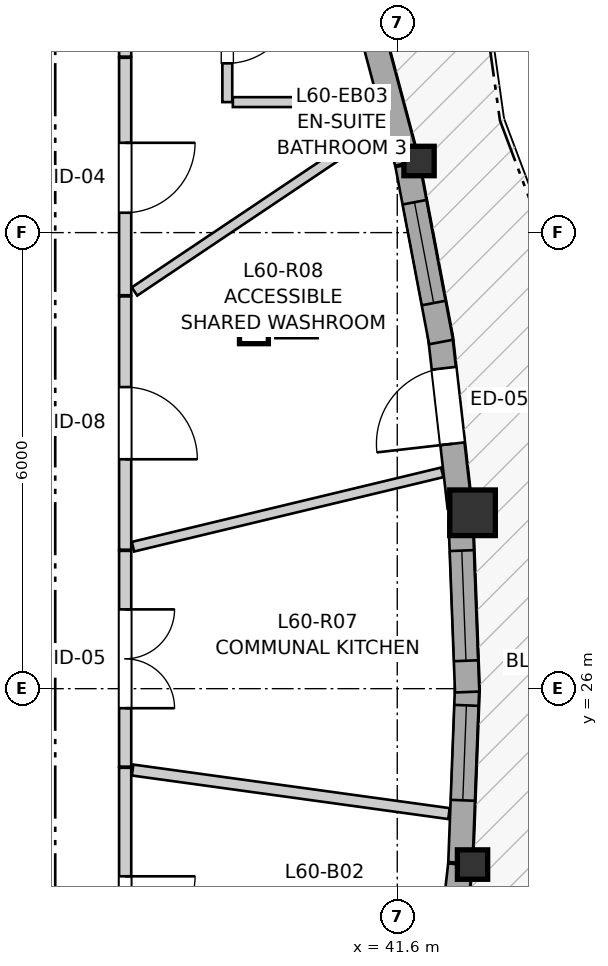
"""IFC4 building model, lengths in metres.
Left out: names, types, materials, properties, quantities, classifications, styles, units other than length and angle.
Written with IfcOpenShell. Run it as: python <this file> out.ifc"""

import sys

from ifc_helpers import new_model, si_unit, direction, frame, frame_2d, origin, origin_2d, place, context, subcontext, project, spatial, rectangle, i_section, extrude, source, transform, mapped, element, fill, save


model = new_model("IFC4")
c1 = context("Model", 3, precision=1e-05, world=origin(), true_north=direction((0.0, 1.0)))
c2 = subcontext(c1, "Body", "Model", "MODEL_VIEW")
j1 = project(units=[si_unit("LENGTHUNIT", "METRE"), si_unit("PLANEANGLEUNIT", "RADIAN")], contexts=[c1])
p1 = place(None, origin())
s1 = spatial("IfcSite", under=j1, at=p1, CompositionType="ELEMENT")
p2 = place(p1, origin())
s2 = spatial("IfcBuilding", under=s1, at=p2, CompositionType="ELEMENT")
p3 = place(p2, frame((0.0, 0.0, 202.0)))
s3 = spatial("IfcBuildingStorey", under=s2, at=p3, CompositionType="ELEMENT", Elevation=202.0)
m1 = source(origin(), c2, "Body", "SweptSolid", [
    extrude(i_section(OverallWidth=0.398, OverallDepth=0.387, WebThickness=0.019, FlangeThickness=0.03, FilletRadius=0.015, at=origin_2d()), origin(), (0.0, 0.0, 1.0), 2.935),
])
p4 = place(p3, frame((42.59, 23.686, 0.0), z_axis=(0.0, 0.0, 1.0), x_axis=(1.0, 0.0, 0.0)))
e1 = element("IfcColumn", 1, at=p4, inside=s3, PredefinedType="PILASTER", context=c2, shape_type="MappedRepresentation", body=[
    mapped(m1, transform((0.0, 0.0, 0.0), x_axis=(1.0, 0.0, 0.0), y_axis=(0.0, 1.0, 0.0), z_axis=(0.0, 0.0, 1.0), scale=1.0)),
])
m2 = source(origin(), c2, "Body", "SweptSolid", [
    extrude(rectangle(XDim=0.6, YDim=0.6, at=origin_2d()), origin(), (0.0, 0.0, 1.0), 2.935),
])
p5 = place(p3, frame((42.59, 28.314, 0.0), z_axis=(0.0, 0.0, 1.0), x_axis=(1.0, 0.0, 0.0)))
e2 = element("IfcColumn", 2, at=p5, inside=s3, PredefinedType="COLUMN", context=c2, shape_type="MappedRepresentation", body=[
    mapped(m2, transform((0.0, 0.0, 0.0), x_axis=(1.0, 0.0, 0.0), y_axis=(0.0, 1.0, 0.0), z_axis=(0.0, 0.0, 1.0), scale=1.0)),
])
p6 = place(p3, frame((41.887, 32.942, 0.0), z_axis=(0.0, 0.0, 1.0), x_axis=(1.0, 0.0, 0.0)))
e3 = element("IfcColumn", 3, at=p6, inside=s3, PredefinedType="PILASTER", context=c2, shape_type="MappedRepresentation", body=[
    mapped(m1, transform((0.0, 0.0, 0.0), x_axis=(1.0, 0.0, 0.0), y_axis=(0.0, 1.0, 0.0), z_axis=(0.0, 0.0, 1.0), scale=1.0)),
])
p7 = place(p3, frame((42.163, 21.352, 0.0), z_axis=(0.0, 0.0, 1.0), x_axis=(0.113273764078, 0.993563814947, 0.0)))
e4 = element("IfcWall", 4, at=p7, inside=s3, PredefinedType="SOLIDWALL", context=c2, shape_type="SweptSolid", body=[
    extrude(rectangle(XDim=2.347, YDim=0.32, at=frame_2d((1.174, 0.0))), origin(), (0.0, 0.0, 1.0), 2.555),
])
p8 = place(p7, frame((0.608, 0.0, 0.82)))
e5 = element("IfcOpeningElement", 5, at=p8, cuts=e4, PredefinedType="OPENING", context=c2, shape_type="SweptSolid", body=[
    extrude(rectangle(XDim=1.15, YDim=1.2, at=frame_2d((0.575, 0.6))), frame((0.0, 0.17, 0.0), z_axis=(0.0, -1.0, 0.0), x_axis=(1.0, 0.0, 0.0)), (0.0, 0.0, 1.0), 0.34),
])
p9 = place(p3, frame((42.431, 23.712, 0.0), z_axis=(0.0, 0.0, 1.0), x_axis=(0.037979071107, 0.999278534823, 0.0)))
e6 = element("IfcWall", 6, at=p9, inside=s3, PredefinedType="SOLIDWALL", context=c2, shape_type="SweptSolid", body=[
    extrude(rectangle(XDim=2.333, YDim=0.32, at=frame_2d((1.167, 0.0))), origin(), (0.0, 0.0, 1.0), 2.555),
])
p10 = place(p9, frame((0.82, 0.0, 0.82)))
e7 = element("IfcOpeningElement", 7, at=p10, cuts=e6, PredefinedType="OPENING", context=c2, shape_type="SweptSolid", body=[
    extrude(rectangle(XDim=1.25, YDim=1.35, at=frame_2d((0.625, 0.675))), frame((0.0, 0.17, 0.0), z_axis=(0.0, -1.0, 0.0), x_axis=(1.0, 0.0, 0.0)), (0.0, 0.0, 1.0), 0.34),
])
p11 = place(p3, frame((42.52, 25.956, 0.0), z_axis=(0.0, 0.0, 1.0), x_axis=(-0.038072753844, 0.999274969873, 0.0)))
e8 = element("IfcWall", 8, at=p11, inside=s3, PredefinedType="SOLIDWALL", context=c2, shape_type="SweptSolid", body=[
    extrude(rectangle(XDim=2.264, YDim=0.32, at=frame_2d((1.132, 0.0))), origin(), (0.0, 0.0, 1.0), 2.555),
])
p12 = place(p11, frame((0.412, 0.0, 0.82)))
e9 = element("IfcOpeningElement", 9, at=p12, cuts=e8, PredefinedType="OPENING", context=c2, shape_type="SweptSolid", body=[
    extrude(rectangle(XDim=1.45, YDim=1.25, at=frame_2d((0.725, 0.625))), frame((0.0, 0.17, 0.0), z_axis=(0.0, -1.0, 0.0), x_axis=(1.0, 0.0, 0.0)), (0.0, 0.0, 1.0), 0.34),
])
p13 = place(p3, frame((42.421, 28.385, 0.0), z_axis=(0.0, 0.0, 1.0), x_axis=(-0.113220012761, 0.993569941529, 0.0)))
e10 = element("IfcWall", 10, at=p13, inside=s3, PredefinedType="SOLIDWALL", context=c2, shape_type="SweptSolid", body=[
    extrude(rectangle(XDim=2.277, YDim=0.32, at=frame_2d((1.139, 0.0))), origin(), (0.0, 0.0, 1.0), 2.555),
])
p14 = place(p13, frame((0.842, 0.0, 0.0)))
e11 = element("IfcOpeningElement", 11, at=p14, cuts=e10, PredefinedType="OPENING", context=c2, shape_type="SweptSolid", body=[
    extrude(rectangle(XDim=1.0, YDim=2.1, at=frame_2d((0.5, 1.05))), frame((0.0, 0.17, 0.0), z_axis=(0.0, -1.0, 0.0), x_axis=(1.0, 0.0, 0.0)), (0.0, 0.0, 1.0), 0.34),
])
p15 = place(p3, frame((42.177, 30.561, 0.0), z_axis=(0.0, 0.0, 1.0), x_axis=(-0.186691421418, 0.982418603839, 0.0)))
e12 = element("IfcWall", 12, at=p15, inside=s3, PredefinedType="SOLIDWALL", context=c2, shape_type="SweptSolid", body=[
    extrude(rectangle(XDim=2.374, YDim=0.32, at=frame_2d((1.187, 0.0))), origin(), (0.0, 0.0, 1.0), 2.555),
])
p16 = place(p15, frame((0.522, 0.0, 0.82)))
e13 = element("IfcOpeningElement", 13, at=p16, cuts=e12, PredefinedType="OPENING", context=c2, shape_type="SweptSolid", body=[
    extrude(rectangle(XDim=1.35, YDim=1.45, at=frame_2d((0.675, 0.725))), frame((0.0, 0.17, 0.0), z_axis=(0.0, -1.0, 0.0), x_axis=(1.0, 0.0, 0.0)), (0.0, 0.0, 1.0), 0.34),
])
p17 = place(p3, frame((41.727, 32.92, 0.0), z_axis=(0.0, 0.0, 1.0), x_axis=(-0.257057896323, 0.96639600472, 0.0)))
e14 = element("IfcWall", 14, at=p17, inside=s3, PredefinedType="SOLIDWALL", context=c2, shape_type="SweptSolid", body=[
    extrude(rectangle(XDim=2.412, YDim=0.32, at=frame_2d((1.206, 0.0))), origin(), (0.0, 0.0, 1.0), 2.555),
])
p18 = place(p3, frame((38.02, 24.959, 0.0), z_axis=(0.0, 0.0, 1.0), x_axis=(0.0, -1.0, 0.0)))
e15 = element("IfcWall", 15, at=p18, inside=s3, PredefinedType="PARTITIONING", context=c2, shape_type="SweptSolid", body=[
    extrude(rectangle(XDim=3.759, YDim=0.16, at=frame_2d((1.879, 0.0))), origin(), (0.0, 0.0, 1.0), 2.935),
])
p19 = place(p18, frame((1.427, 0.0, 0.0)))
e16 = element("IfcOpeningElement", 16, at=p19, cuts=e15, PredefinedType="OPENING", context=c2, shape_type="SweptSolid", body=[
    extrude(rectangle(XDim=0.92, YDim=2.1, at=frame_2d((0.46, 1.05))), frame((0.0, 0.09, 0.0), z_axis=(0.0, -1.0, 0.0), x_axis=(1.0, 0.0, 0.0)), (0.0, 0.0, 1.0), 0.18),
])
p20 = place(p3, frame((38.02, 31.161, 0.0), z_axis=(0.0, 0.0, 1.0), x_axis=(0.0, -1.0, 0.0)))
e17 = element("IfcWall", 17, at=p20, inside=s3, PredefinedType="PARTITIONING", context=c2, shape_type="SweptSolid", body=[
    extrude(rectangle(XDim=3.333, YDim=0.16, at=frame_2d((1.667, 0.0))), origin(), (0.0, 0.0, 1.0), 2.603),
])
p21 = place(p20, frame((1.193, 0.0, 0.0)))
e18 = element("IfcOpeningElement", 18, at=p21, cuts=e17, PredefinedType="OPENING", context=c2, shape_type="SweptSolid", body=[
    extrude(rectangle(XDim=0.95, YDim=2.1, at=frame_2d((0.475, 1.05))), frame((0.0, 0.09, 0.0), z_axis=(0.0, -1.0, 0.0), x_axis=(1.0, 0.0, 0.0)), (0.0, 0.0, 1.0), 0.18),
])
p22 = place(p3, frame((38.02, 34.3, 0.0), z_axis=(0.0, 0.0, 1.0), x_axis=(0.0, -1.0, 0.0)))
e19 = element("IfcWall", 19, at=p22, inside=s3, PredefinedType="PARTITIONING", context=c2, shape_type="SweptSolid", body=[
    extrude(rectangle(XDim=3.124, YDim=0.16, at=frame_2d((1.562, 0.0))), origin(), (0.0, 0.0, 1.0), 2.603),
])
p23 = place(p22, frame((1.118, 0.0, 0.0)))
e20 = element("IfcOpeningElement", 20, at=p23, cuts=e19, PredefinedType="OPENING", context=c2, shape_type="SweptSolid", body=[
    extrude(rectangle(XDim=0.92, YDim=2.1, at=frame_2d((0.46, 1.05))), frame((0.0, 0.09, 0.0), z_axis=(0.0, -1.0, 0.0), x_axis=(1.0, 0.0, 0.0)), (0.0, 0.0, 1.0), 0.18),
])
p24 = place(p3, frame((38.02, 27.813, 0.0), z_axis=(0.0, 0.0, 1.0), x_axis=(0.0, -1.0, 0.0)))
e21 = element("IfcWall", 21, at=p24, inside=s3, PredefinedType="PARTITIONING", context=c2, shape_type="SweptSolid", body=[
    extrude(rectangle(XDim=2.839, YDim=0.16, at=frame_2d((1.419, 0.0))), origin(), (0.0, 0.0, 1.0), 2.935),
])
p25 = place(p24, frame((0.77, 0.0, 0.0)))
e22 = element("IfcOpeningElement", 22, at=p25, cuts=e21, PredefinedType="OPENING", context=c2, shape_type="SweptSolid", body=[
    extrude(rectangle(XDim=1.3, YDim=2.1, at=frame_2d((0.65, 1.05))), frame((0.0, 0.09, 0.0), z_axis=(0.0, -1.0, 0.0), x_axis=(1.0, 0.0, 0.0)), (0.0, 0.0, 1.0), 0.18),
])
p26 = place(p3, frame((39.364, 35.617, 0.0), z_axis=(0.0, 0.0, 1.0), x_axis=(0.0, -1.0, 0.0)))
e23 = element("IfcWall", 23, at=p26, inside=s3, PredefinedType="PARTITIONING", context=c2, shape_type="SweptSolid", body=[
    extrude(rectangle(XDim=1.9, YDim=0.13, at=frame_2d((0.95, 0.0))), origin(), (0.0, 0.0, 1.0), 2.573),
])
p27 = place(p26, frame((0.51, 0.0, 0.0)))
e24 = element("IfcOpeningElement", 24, at=p27, cuts=e23, PredefinedType="OPENING", context=c2, shape_type="SweptSolid", body=[
    extrude(rectangle(XDim=0.88, YDim=2.05, at=frame_2d((0.44, 1.025))), frame((0.0, 0.075, 0.0), z_axis=(0.0, -1.0, 0.0), x_axis=(1.0, 0.0, 0.0)), (0.0, 0.0, 1.0), 0.15),
])
p28 = place(p3, frame((38.118, 24.929, 0.0), z_axis=(0.0, 0.0, 1.0), x_axis=(0.990658246077, -0.136368029533, 0.0)))
e25 = element("IfcWall", 25, at=p28, inside=s3, PredefinedType="PARTITIONING", context=c2, shape_type="SweptSolid", body=[
    extrude(rectangle(XDim=4.202, YDim=0.145, at=frame_2d((2.101, 0.0))), origin(), (0.0, 0.0, 1.0), 2.935),
])
p29 = place(p3, frame((38.123, 27.868, 0.0), z_axis=(0.0, 0.0, 1.0), x_axis=(0.972302502293, 0.233726002051, 0.0)))
e26 = element("IfcWall", 26, at=p29, inside=s3, PredefinedType="PARTITIONING", context=c2, shape_type="SweptSolid", body=[
    extrude(rectangle(XDim=4.185, YDim=0.13, at=frame_2d((2.092, 0.0))), origin(), (0.0, 0.0, 1.0), 2.935),
])
p30 = place(p3, frame((38.143, 31.225, 0.0), z_axis=(0.0, 0.0, 1.0), x_axis=(0.830560844451, 0.556927898084, 0.0)))
e27 = element("IfcWall", 27, at=p30, inside=s3, PredefinedType="PARTITIONING", context=c2, shape_type="SweptSolid", body=[
    extrude(rectangle(XDim=3.942, YDim=0.13, at=frame_2d((1.971, 0.0))), origin(), (0.0, 0.0, 1.0), 2.935),
])
p31 = place(p3, frame((39.437, 33.717, 0.0), z_axis=(0.0, 0.0, 1.0), x_axis=(1.0, 0.0, 0.0)))
e28 = element("IfcWall", 28, at=p31, inside=s3, PredefinedType="PARTITIONING", context=c2, shape_type="SweptSolid", body=[
    extrude(rectangle(XDim=1.727, YDim=0.13, at=frame_2d((0.864, 0.0))), origin(), (0.0, 0.0, 1.0), 2.935),
])
p32 = place(p3, frame((38.02, 34.315, 0.0), z_axis=(0.0, 0.0, 1.0), x_axis=(0.0, 1.0, 0.0)))
e29 = element("IfcWall", 29, at=p32, inside=s3, PredefinedType="PARTITIONING", context=c2, shape_type="SweptSolid", body=[
    extrude(rectangle(XDim=1.605, YDim=0.16, at=frame_2d((0.802, 0.0))), origin(), (0.0, 0.0, 1.0), 2.603),
])
m3 = source(origin(), c2, "Body", "SweptSolid", [
    extrude(rectangle(XDim=1.25, YDim=1.35, at=frame_2d((0.625, 0.675))), frame((0.0, 0.03, 0.0), z_axis=(0.0, -1.0, 0.0), x_axis=(1.0, 0.0, 0.0)), (0.0, 0.0, 1.0), 0.06),
])
p33 = place(p10, origin())
e30 = element("IfcWindow", 30, at=p33, inside=s3, PartitioningType="SINGLE_PANEL", PredefinedType="WINDOW", context=c2, shape_type="MappedRepresentation", body=[
    mapped(m3, transform((0.0, 0.0, 0.0), x_axis=(1.0, 0.0, 0.0), y_axis=(0.0, 1.0, 0.0), z_axis=(0.0, 0.0, 1.0), scale=1.0)),
])
fill(e7, e30)
m4 = source(origin(), c2, "Body", "SweptSolid", [
    extrude(rectangle(XDim=1.45, YDim=1.25, at=frame_2d((0.725, 0.625))), frame((0.0, 0.03, 0.0), z_axis=(0.0, -1.0, 0.0), x_axis=(1.0, 0.0, 0.0)), (0.0, 0.0, 1.0), 0.06),
])
p34 = place(p12, origin())
e31 = element("IfcWindow", 31, at=p34, inside=s3, PartitioningType="SINGLE_PANEL", PredefinedType="WINDOW", context=c2, shape_type="MappedRepresentation", body=[
    mapped(m4, transform((0.0, 0.0, 0.0), x_axis=(1.0, 0.0, 0.0), y_axis=(0.0, 1.0, 0.0), z_axis=(0.0, 0.0, 1.0), scale=1.0)),
])
fill(e9, e31)
m5 = source(origin(), c2, "Body", "SweptSolid", [
    extrude(rectangle(XDim=1.0, YDim=2.1, at=frame_2d((0.5, 1.05))), frame((0.0, 0.025, 0.0), z_axis=(0.0, -1.0, 0.0), x_axis=(1.0, 0.0, 0.0)), (0.0, 0.0, 1.0), 0.05),
])
p35 = place(p14, origin())
e32 = element("IfcDoor", 32, at=p35, inside=s3, OperationType="SINGLE_SWING_LEFT", PredefinedType="DOOR", context=c2, shape_type="MappedRepresentation", body=[
    mapped(m5, transform((0.0, 0.0, 0.0), x_axis=(1.0, 0.0, 0.0), y_axis=(0.0, 1.0, 0.0), z_axis=(0.0, 0.0, 1.0), scale=1.0)),
])
fill(e11, e32)
m6 = source(origin(), c2, "Body", "SweptSolid", [
    extrude(rectangle(XDim=1.35, YDim=1.45, at=frame_2d((0.675, 0.725))), frame((0.0, 0.03, 0.0), z_axis=(0.0, -1.0, 0.0), x_axis=(1.0, 0.0, 0.0)), (0.0, 0.0, 1.0), 0.06),
])
p36 = place(p16, origin())
e33 = element("IfcWindow", 33, at=p36, inside=s3, PartitioningType="SINGLE_PANEL", PredefinedType="WINDOW", context=c2, shape_type="MappedRepresentation", body=[
    mapped(m6, transform((0.0, 0.0, 0.0), x_axis=(1.0, 0.0, 0.0), y_axis=(0.0, 1.0, 0.0), z_axis=(0.0, 0.0, 1.0), scale=1.0)),
])
fill(e13, e33)
m7 = source(origin(), c2, "Body", "SweptSolid", [
    extrude(rectangle(XDim=0.92, YDim=2.1, at=frame_2d((0.46, 1.05))), frame((0.0, 0.025, 0.0), z_axis=(0.0, -1.0, 0.0), x_axis=(1.0, 0.0, 0.0)), (0.0, 0.0, 1.0), 0.05),
])
p37 = place(p19, origin())
e34 = element("IfcDoor", 34, at=p37, inside=s3, OperationType="SINGLE_SWING_LEFT", PredefinedType="DOOR", context=c2, shape_type="MappedRepresentation", body=[
    mapped(m7, transform((0.0, 0.0, 0.0), x_axis=(1.0, 0.0, 0.0), y_axis=(0.0, 1.0, 0.0), z_axis=(0.0, 0.0, 1.0), scale=1.0)),
])
fill(e16, e34)
m8 = source(origin(), c2, "Body", "SweptSolid", [
    extrude(rectangle(XDim=0.95, YDim=2.1, at=frame_2d((0.475, 1.05))), frame((0.0, 0.025, 0.0), z_axis=(0.0, -1.0, 0.0), x_axis=(1.0, 0.0, 0.0)), (0.0, 0.0, 1.0), 0.05),
])
p38 = place(p21, origin())
e35 = element("IfcDoor", 35, at=p38, inside=s3, OperationType="SINGLE_SWING_RIGHT", PredefinedType="DOOR", context=c2, shape_type="MappedRepresentation", body=[
    mapped(m8, transform((0.0, 0.0, 0.0), x_axis=(1.0, 0.0, 0.0), y_axis=(0.0, 1.0, 0.0), z_axis=(0.0, 0.0, 1.0), scale=1.0)),
])
fill(e18, e35)
p39 = place(p23, origin())
e36 = element("IfcDoor", 36, at=p39, inside=s3, OperationType="SINGLE_SWING_LEFT", PredefinedType="DOOR", context=c2, shape_type="MappedRepresentation", body=[
    mapped(m7, transform((0.0, 0.0, 0.0), x_axis=(1.0, 0.0, 0.0), y_axis=(0.0, 1.0, 0.0), z_axis=(0.0, 0.0, 1.0), scale=1.0)),
])
fill(e20, e36)
m9 = source(origin(), c2, "Body", "SweptSolid", [
    extrude(rectangle(XDim=1.3, YDim=2.1, at=frame_2d((0.65, 1.05))), frame((0.0, 0.025, 0.0), z_axis=(0.0, -1.0, 0.0), x_axis=(1.0, 0.0, 0.0)), (0.0, 0.0, 1.0), 0.05),
])
p40 = place(p25, origin())
e37 = element("IfcDoor", 37, at=p40, inside=s3, OperationType="DOUBLE_DOOR_SINGLE_SWING", PredefinedType="DOOR", context=c2, shape_type="MappedRepresentation", body=[
    mapped(m9, transform((0.0, 0.0, 0.0), x_axis=(1.0, 0.0, 0.0), y_axis=(0.0, 1.0, 0.0), z_axis=(0.0, 0.0, 1.0), scale=1.0)),
])
fill(e22, e37)
m10 = source(origin(), c2, "Body", "SweptSolid", [
    extrude(rectangle(XDim=0.88, YDim=2.05, at=frame_2d((0.44, 1.025))), frame((0.0, 0.025, 0.0), z_axis=(0.0, -1.0, 0.0), x_axis=(1.0, 0.0, 0.0)), (0.0, 0.0, 1.0), 0.05),
])
p41 = place(p27, origin())
e38 = element("IfcDoor", 38, at=p41, inside=s3, OperationType="SINGLE_SWING_LEFT", PredefinedType="DOOR", context=c2, shape_type="MappedRepresentation", body=[
    mapped(m10, transform((0.0, 0.0, 0.0), x_axis=(1.0, 0.0, 0.0), y_axis=(0.0, 1.0, 0.0), z_axis=(0.0, 0.0, 1.0), scale=1.0)),
])
fill(e24, e38)
save(model, sys.argv[1])
